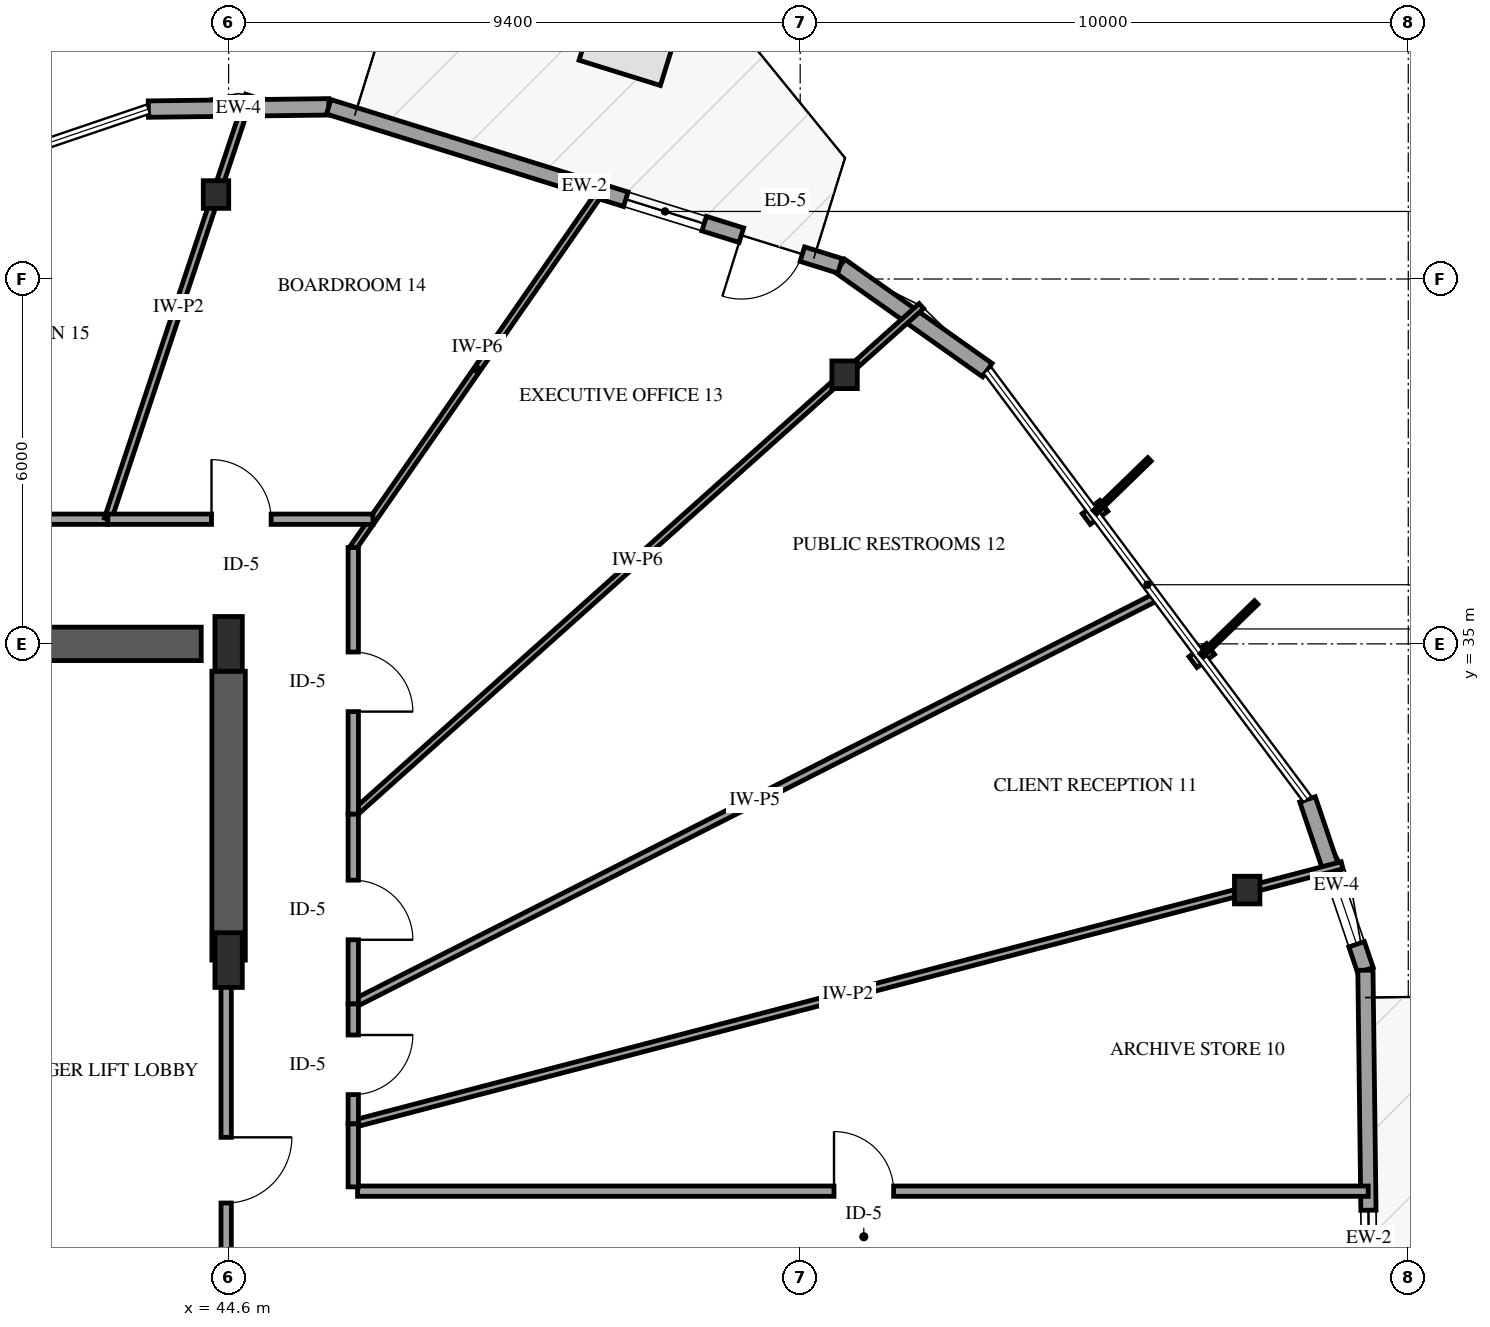
"""IFC4 building model, lengths in metres.
Left out: names, types, materials, properties, quantities, classifications, styles, units other than length and angle.
Written with IfcOpenShell. Run it as: python <this file> out.ifc"""

import sys

from ifc_helpers import new_model, si_unit, direction, frame, frame_2d, origin, origin_2d, place, context, subcontext, project, spatial, rectangle, i_section, extrude, element, fill, save


model = new_model("IFC4")
c1 = context("Model", 3, precision=1e-05, world=origin(), true_north=direction((0.0, 1.0)))
c2 = subcontext(c1, "Body", "Model", "MODEL_VIEW")
j1 = project(units=[si_unit("LENGTHUNIT", "METRE"), si_unit("PLANEANGLEUNIT", "RADIAN")], contexts=[c1])
p1 = place(None, origin())
s1 = spatial("IfcSite", under=j1, at=p1, CompositionType="ELEMENT")
p2 = place(p1, origin())
s2 = spatial("IfcBuilding", under=s1, at=p2, CompositionType="ELEMENT")
p3 = place(p2, frame((0.0, 0.0, 106.9)))
s3 = spatial("IfcBuildingStorey", under=s2, at=p3, CompositionType="ELEMENT", Elevation=106.9)
p4 = place(p3, frame((41.3, 35.0, 0.0), z_axis=(0.0, 0.0, 1.0), x_axis=(1.0, 0.0, 0.0)))
e1 = element("IfcWall", 1, at=p4, inside=s3, PredefinedType="SHEAR", context=c2, shape_type="SweptSolid", body=[
    extrude(rectangle(XDim=2.85, YDim=0.55, at=frame_2d((1.425, 0.0))), origin(), (0.0, 0.0, 1.0), 3.9),
])
p5 = place(p3, frame((44.6, 29.8, 0.0), z_axis=(0.0, 0.0, 1.0), x_axis=(0.0, 1.0, 0.0)))
e2 = element("IfcWall", 2, at=p5, inside=s3, PredefinedType="SHEAR", context=c2, shape_type="SweptSolid", body=[
    extrude(rectangle(XDim=4.75, YDim=0.55, at=frame_2d((2.375, 0.0))), origin(), (0.0, 0.0, 1.0), 3.9),
])
for number, where, z_axis, x_axis in (
    (3, (44.6, 29.8, 0.0), (0.0, 0.0, 1.0), (1.0, 0.0, 0.0)),
    (4, (44.6, 35.0, 0.0), (0.0, 0.0, 1.0), (1.0, 0.0, 0.0)),
):
    element("IfcColumn", number, at=place(p3, frame(where, z_axis=z_axis, x_axis=x_axis)), inside=s3, PredefinedType="PILASTER", context=c2, shape_type="SweptSolid", body=[
        extrude(rectangle(XDim=0.45, YDim=0.9, at=origin_2d()), origin(), (0.0, 0.0, 1.0), 3.9),
    ])
for number, where, z_axis, x_axis in (
    (5, (61.351, 30.951, 0.0), (0.0, 0.0, 1.0), (1.0, 0.0, 0.0)),
    (6, (54.73, 39.425, 0.0), (0.0, 0.0, 1.0), (1.0, 0.0, 0.0)),
    (7, (44.393, 42.389, 0.0), (0.0, 0.0, 1.0), (1.0, 0.0, 0.0)),
):
    element("IfcColumn", number, at=place(p3, frame(where, z_axis=z_axis, x_axis=x_axis)), inside=s3, PredefinedType="COLUMN", context=c2, shape_type="SweptSolid", body=[
        extrude(i_section(OverallWidth=0.418, OverallDepth=0.455, WebThickness=0.042, FlangeThickness=0.068, FilletRadius=0.038, at=origin_2d()), origin(), (0.0, 0.0, 1.0), 3.9),
    ])
p6 = place(p3, frame((57.077, 39.502, 0.0), z_axis=(0.0, 0.0, 1.0), x_axis=(-0.816333298617, 0.577581116009, 0.0)))
e8 = element("IfcWall", 8, at=p6, inside=s3, PredefinedType="SOLIDWALL", context=c2, shape_type="SweptSolid", body=[
    extrude(rectangle(XDim=2.967, YDim=0.27, at=frame_2d((1.483, 0.0))), origin(), (0.0, 0.0, 1.0), 2.979),
])
p7 = place(p3, frame((46.247, 43.832, 0.0), z_axis=(0.0, 0.0, 1.0), x_axis=(-0.999920709684, -0.012592630552, 0.0)))
e9 = element("IfcWall", 9, at=p7, inside=s3, PredefinedType="SOLIDWALL", context=c2, shape_type="SweptSolid", body=[
    extrude(rectangle(XDim=2.966, YDim=0.27, at=frame_2d((1.483, 0.0))), origin(), (0.0, 0.0, 1.0), 2.979),
])
p8 = place(p3, frame((54.656, 41.216, 0.0), z_axis=(0.0, 0.0, 1.0), x_axis=(-0.954863940641, 0.297043523516, 0.0)))
e10 = element("IfcWall", 10, at=p8, inside=s3, PredefinedType="SOLIDWALL", context=c2, shape_type="SweptSolid", body=[
    extrude(rectangle(XDim=8.807, YDim=0.25, at=frame_2d((4.403, 0.0))), origin(), (0.0, 0.0, 1.0), 2.979),
])
p9 = place(p8, frame((0.65, 0.0, 0.0)))
e11 = element("IfcOpeningElement", 11, at=p9, cuts=e10, PredefinedType="OPENING", context=c2, shape_type="SweptSolid", body=[
    extrude(rectangle(XDim=1.05, YDim=2.15, at=frame_2d((0.525, 1.075))), frame((0.0, 0.135, 0.0), z_axis=(0.0, -1.0, 0.0), x_axis=(1.0, 0.0, 0.0)), (0.0, 0.0, 1.0), 0.27),
])
p10 = place(p8, frame((2.34, 0.0, 0.72)))
e12 = element("IfcOpeningElement", 12, at=p10, cuts=e10, PredefinedType="OPENING", context=c2, shape_type="SweptSolid", body=[
    extrude(rectangle(XDim=1.35, YDim=1.65, at=frame_2d((0.675, 0.825))), frame((0.0, 0.135, 0.0), z_axis=(0.0, -1.0, 0.0), x_axis=(1.0, 0.0, 0.0)), (0.0, 0.0, 1.0), 0.27),
])
p11 = place(p3, frame((63.295, 29.634, 0.0), z_axis=(0.0, 0.0, 1.0), x_axis=(-0.320964212706, 0.947091323032, 0.0)))
e13 = element("IfcWall", 13, at=p11, inside=s3, PredefinedType="SOLIDWALL", context=c2, shape_type="SweptSolid", body=[
    extrude(rectangle(XDim=2.967, YDim=0.27, at=frame_2d((1.483, 0.0))), origin(), (0.0, 0.0, 1.0), 2.979),
])
p12 = place(p11, frame((0.45, 0.0, 0.75)))
e14 = element("IfcOpeningElement", 14, at=p12, cuts=e13, PredefinedType="OPENING", context=c2, shape_type="SweptSolid", body=[
    extrude(rectangle(XDim=0.9, YDim=1.5, at=frame_2d((0.45, 0.75))), frame((0.0, 0.145, 0.0), z_axis=(0.0, -1.0, 0.0), x_axis=(1.0, 0.0, 0.0)), (0.0, 0.0, 1.0), 0.29),
])
p13 = place(p3, frame((63.406, 20.828, 0.0), z_axis=(0.0, 0.0, 1.0), x_axis=(-0.012558271015, 0.999921141805, 0.0)))
e15 = element("IfcWall", 15, at=p13, inside=s3, PredefinedType="SOLIDWALL", context=c2, shape_type="SweptSolid", body=[
    extrude(rectangle(XDim=8.807, YDim=0.25, at=frame_2d((4.403, 0.0))), origin(), (0.0, 0.0, 1.0), 2.979),
])
p14 = place(p13, frame((0.65, 0.0, 0.0)))
e16 = element("IfcOpeningElement", 16, at=p14, cuts=e15, PredefinedType="OPENING", context=c2, shape_type="SweptSolid", body=[
    extrude(rectangle(XDim=1.05, YDim=2.15, at=frame_2d((0.525, 1.075))), frame((0.0, 0.135, 0.0), z_axis=(0.0, -1.0, 0.0), x_axis=(1.0, 0.0, 0.0)), (0.0, 0.0, 1.0), 0.27),
])
p15 = place(p13, frame((3.509, 0.0, 0.72)))
e17 = element("IfcOpeningElement", 17, at=p15, cuts=e15, PredefinedType="OPENING", context=c2, shape_type="SweptSolid", body=[
    extrude(rectangle(XDim=1.35, YDim=1.65, at=frame_2d((0.675, 0.825))), frame((0.0, 0.135, 0.0), z_axis=(0.0, -1.0, 0.0), x_axis=(1.0, 0.0, 0.0)), (0.0, 0.0, 1.0), 0.27),
])
p16 = place(p3, frame((46.65, 27.106, 0.0), z_axis=(0.0, 0.0, 1.0), x_axis=(0.967462851525, 0.253013104242, 0.0)))
e18 = element("IfcWall", 18, at=p16, inside=s3, PredefinedType="PARTITIONING", context=c2, shape_type="SweptSolid", body=[
    extrude(rectangle(XDim=16.809, YDim=0.12, at=frame_2d((8.405, 0.0))), origin(), (0.0, 0.0, 1.0), 2.895),
])
p17 = place(p3, frame((46.72, 26.0, 0.0), z_axis=(0.0, 0.0, 1.0), x_axis=(1.0, 0.0, 0.0)))
e19 = element("IfcWall", 19, at=p17, inside=s3, PredefinedType="PARTITIONING", context=c2, shape_type="SweptSolid", body=[
    extrude(rectangle(XDim=16.621, YDim=0.17, at=frame_2d((8.311, 0.0))), origin(), (0.0, 0.0, 1.0), 3.6),
])
p18 = place(p17, frame((7.836, 0.0, 0.0)))
e20 = element("IfcOpeningElement", 20, at=p18, cuts=e19, PredefinedType="OPENING", context=c2, shape_type="SweptSolid", body=[
    extrude(rectangle(XDim=0.98, YDim=2.15, at=frame_2d((0.49, 1.075))), frame((0.0, 0.095, 0.0), z_axis=(0.0, -1.0, 0.0), x_axis=(1.0, 0.0, 0.0)), (0.0, 0.0, 1.0), 0.19),
])
p19 = place(p3, frame((46.65, 29.079, 0.0), z_axis=(0.0, 0.0, 1.0), x_axis=(0.891973908544, 0.452086879345, 0.0)))
e21 = element("IfcWall", 21, at=p19, inside=s3, PredefinedType="PARTITIONING", context=c2, shape_type="SweptSolid", body=[
    extrude(rectangle(XDim=14.809, YDim=0.13, at=frame_2d((7.404, 0.0))), origin(), (0.0, 0.0, 1.0), 3.6),
])
p20 = place(p3, frame((46.65, 32.199, 0.0), z_axis=(0.0, 0.0, 1.0), x_axis=(0.74538342222, 0.666635998038, 0.0)))
e22 = element("IfcWall", 22, at=p20, inside=s3, PredefinedType="PARTITIONING", context=c2, shape_type="SweptSolid", body=[
    extrude(rectangle(XDim=12.534, YDim=0.11, at=frame_2d((6.267, 0.0))), origin(), (0.0, 0.0, 1.0), 2.978),
])
p21 = place(p3, frame((34.81, 37.05, 0.0), z_axis=(0.0, 0.0, 1.0), x_axis=(1.0, 0.0, 0.0)))
e23 = element("IfcWall", 23, at=p21, inside=s3, PredefinedType="PARTITIONING", context=c2, shape_type="SweptSolid", body=[
    extrude(rectangle(XDim=7.804, YDim=0.17, at=frame_2d((3.902, 0.0))), origin(), (0.0, 0.0, 1.0), 3.6),
])
p22 = place(p21, frame((3.427, 0.0, 0.0)))
e24 = element("IfcOpeningElement", 24, at=p22, cuts=e23, PredefinedType="OPENING", context=c2, shape_type="SweptSolid", body=[
    extrude(rectangle(XDim=0.98, YDim=2.15, at=frame_2d((0.49, 1.075))), frame((0.0, 0.095, 0.0), z_axis=(0.0, -1.0, 0.0), x_axis=(1.0, 0.0, 0.0)), (0.0, 0.0, 1.0), 0.19),
])
p23 = place(p3, frame((42.614, 37.05, 0.0), z_axis=(0.0, 0.0, 1.0), x_axis=(0.316108163988, 0.948723157017, 0.0)))
e25 = element("IfcWall", 25, at=p23, inside=s3, PredefinedType="PARTITIONING", context=c2, shape_type="SweptSolid", body=[
    extrude(rectangle(XDim=7.349, YDim=0.12, at=frame_2d((3.674, 0.0))), origin(), (0.0, 0.0, 1.0), 2.895),
])
p24 = place(p3, frame((46.65, 36.584, 0.0), z_axis=(0.0, 0.0, 1.0), x_axis=(0.570720394005, 0.821144464675, 0.0)))
e26 = element("IfcWall", 26, at=p24, inside=s3, PredefinedType="PARTITIONING", context=c2, shape_type="SweptSolid", body=[
    extrude(rectangle(XDim=7.131, YDim=0.11, at=frame_2d((3.566, 0.0))), origin(), (0.0, 0.0, 1.0), 3.6),
])
p25 = place(p3, frame((44.56, 29.8, 0.0), z_axis=(0.0, 0.0, 1.0), x_axis=(0.0, -1.0, 0.0)))
e27 = element("IfcWall", 27, at=p25, inside=s3, PredefinedType="PARTITIONING", context=c2, shape_type="SweptSolid", body=[
    extrude(rectangle(XDim=6.91, YDim=0.17, at=frame_2d((3.455, 0.0))), origin(), (0.0, 0.0, 1.0), 2.64),
])
p26 = place(p25, frame((2.915, 0.0, 0.0)))
e28 = element("IfcOpeningElement", 28, at=p26, cuts=e27, PredefinedType="OPENING", context=c2, shape_type="SweptSolid", body=[
    extrude(rectangle(XDim=1.08, YDim=2.15, at=frame_2d((0.54, 1.075))), frame((0.0, 0.095, 0.0), z_axis=(0.0, -1.0, 0.0), x_axis=(1.0, 0.0, 0.0)), (0.0, 0.0, 1.0), 0.19),
])
p27 = place(p3, frame((46.65, 36.584, 0.0), z_axis=(0.0, 0.0, 1.0), x_axis=(0.0, -1.0, 0.0)))
e29 = element("IfcWall", 29, at=p27, inside=s3, PredefinedType="PARTITIONING", context=c2, shape_type="SweptSolid", body=[
    extrude(rectangle(XDim=4.385, YDim=0.17, at=frame_2d((2.192, 0.0))), origin(), (0.0, 0.0, 1.0), 3.6),
])
p28 = place(p27, frame((1.718, 0.0, 0.0)))
e30 = element("IfcOpeningElement", 30, at=p28, cuts=e29, PredefinedType="OPENING", context=c2, shape_type="SweptSolid", body=[
    extrude(rectangle(XDim=0.98, YDim=2.15, at=frame_2d((0.49, 1.075))), frame((0.0, 0.095, 0.0), z_axis=(0.0, -1.0, 0.0), x_axis=(1.0, 0.0, 0.0)), (0.0, 0.0, 1.0), 0.19),
])
p29 = place(p3, frame((42.614, 37.05, 0.0), z_axis=(0.0, 0.0, 1.0), x_axis=(1.0, 0.0, 0.0)))
e31 = element("IfcWall", 31, at=p29, inside=s3, PredefinedType="PARTITIONING", context=c2, shape_type="SweptSolid", body=[
    extrude(rectangle(XDim=4.36, YDim=0.17, at=frame_2d((2.18, 0.0))), origin(), (0.0, 0.0, 1.0), 3.6),
])
p30 = place(p29, frame((1.705, 0.0, 0.0)))
e32 = element("IfcOpeningElement", 32, at=p30, cuts=e31, PredefinedType="OPENING", context=c2, shape_type="SweptSolid", body=[
    extrude(rectangle(XDim=0.98, YDim=2.15, at=frame_2d((0.49, 1.075))), frame((0.0, 0.095, 0.0), z_axis=(0.0, -1.0, 0.0), x_axis=(1.0, 0.0, 0.0)), (0.0, 0.0, 1.0), 0.19),
])
p31 = place(p3, frame((46.65, 32.199, 0.0), z_axis=(0.0, 0.0, 1.0), x_axis=(0.0, -1.0, 0.0)))
e33 = element("IfcWall", 33, at=p31, inside=s3, PredefinedType="PARTITIONING", context=c2, shape_type="SweptSolid", body=[
    extrude(rectangle(XDim=3.12, YDim=0.17, at=frame_2d((1.56, 0.0))), origin(), (0.0, 0.0, 1.0), 3.6),
])
p32 = place(p31, frame((1.085, 0.0, 0.0)))
e34 = element("IfcOpeningElement", 34, at=p32, cuts=e33, PredefinedType="OPENING", context=c2, shape_type="SweptSolid", body=[
    extrude(rectangle(XDim=0.98, YDim=2.15, at=frame_2d((0.49, 1.075))), frame((0.0, 0.095, 0.0), z_axis=(0.0, -1.0, 0.0), x_axis=(1.0, 0.0, 0.0)), (0.0, 0.0, 1.0), 0.19),
])
p33 = place(p3, frame((46.65, 29.079, 0.0), z_axis=(0.0, 0.0, 1.0), x_axis=(0.0, -1.0, 0.0)))
e35 = element("IfcWall", 35, at=p33, inside=s3, PredefinedType="PARTITIONING", context=c2, shape_type="SweptSolid", body=[
    extrude(rectangle(XDim=1.973, YDim=0.17, at=frame_2d((0.987, 0.0))), origin(), (0.0, 0.0, 1.0), 3.6),
])
p34 = place(p33, frame((0.511, 0.0, 0.0)))
e36 = element("IfcOpeningElement", 36, at=p34, cuts=e35, PredefinedType="OPENING", context=c2, shape_type="SweptSolid", body=[
    extrude(rectangle(XDim=0.98, YDim=2.15, at=frame_2d((0.49, 1.075))), frame((0.0, 0.095, 0.0), z_axis=(0.0, -1.0, 0.0), x_axis=(1.0, 0.0, 0.0)), (0.0, 0.0, 1.0), 0.19),
])
p35 = place(p3, frame((46.65, 27.106, 0.0), z_axis=(0.0, 0.0, 1.0), x_axis=(0.0, -1.0, 0.0)))
e37 = element("IfcWall", 37, at=p35, inside=s3, PredefinedType="PARTITIONING", context=c2, shape_type="SweptSolid", body=[
    extrude(rectangle(XDim=1.036, YDim=0.17, at=frame_2d((0.518, 0.0))), origin(), (0.0, 0.0, 1.0), 3.6),
])
p36 = place(p9, origin())
e38 = element("IfcDoor", 38, at=p36, inside=s3, OperationType="SINGLE_SWING_RIGHT", PredefinedType="DOOR", context=c2, shape_type="SweptSolid", body=[
    extrude(rectangle(XDim=1.05, YDim=2.15, at=frame_2d((0.525, 1.075))), frame((0.0, 0.025, 0.0), z_axis=(0.0, -1.0, 0.0), x_axis=(1.0, 0.0, 0.0)), (0.0, 0.0, 1.0), 0.05),
])
fill(e11, e38)
p37 = place(p10, origin())
e39 = element("IfcWindow", 39, at=p37, inside=s3, PartitioningType="SINGLE_PANEL", PredefinedType="WINDOW", context=c2, shape_type="SweptSolid", body=[
    extrude(rectangle(XDim=1.35, YDim=1.65, at=frame_2d((0.675, 0.825))), frame((0.0, 0.03, 0.0), z_axis=(0.0, -1.0, 0.0), x_axis=(1.0, 0.0, 0.0)), (0.0, 0.0, 1.0), 0.06),
])
fill(e12, e39)
p38 = place(p12, origin())
e40 = element("IfcWindow", 40, at=p38, inside=s3, PartitioningType="SINGLE_PANEL", PredefinedType="WINDOW", context=c2, shape_type="SweptSolid", body=[
    extrude(rectangle(XDim=0.9, YDim=1.5, at=frame_2d((0.45, 0.75))), frame((0.0, 0.03, 0.0), z_axis=(0.0, -1.0, 0.0), x_axis=(1.0, 0.0, 0.0)), (0.0, 0.0, 1.0), 0.06),
])
fill(e14, e40)
p39 = place(p15, origin())
e41 = element("IfcWindow", 41, at=p39, inside=s3, PartitioningType="SINGLE_PANEL", PredefinedType="WINDOW", context=c2, shape_type="SweptSolid", body=[
    extrude(rectangle(XDim=1.35, YDim=1.65, at=frame_2d((0.675, 0.825))), frame((0.0, 0.03, 0.0), z_axis=(0.0, -1.0, 0.0), x_axis=(1.0, 0.0, 0.0)), (0.0, 0.0, 1.0), 0.06),
])
fill(e17, e41)
p40 = place(p18, origin())
e42 = element("IfcDoor", 42, at=p40, inside=s3, OperationType="SINGLE_SWING_LEFT", PredefinedType="DOOR", context=c2, shape_type="SweptSolid", body=[
    extrude(rectangle(XDim=0.98, YDim=2.15, at=frame_2d((0.49, 1.075))), frame((0.0, 0.025, 0.0), z_axis=(0.0, -1.0, 0.0), x_axis=(1.0, 0.0, 0.0)), (0.0, 0.0, 1.0), 0.05),
])
fill(e20, e42)
p41 = place(p26, origin())
e43 = element("IfcDoor", 43, at=p41, inside=s3, OperationType="SINGLE_SWING_LEFT", PredefinedType="DOOR", context=c2, shape_type="SweptSolid", body=[
    extrude(rectangle(XDim=1.08, YDim=2.15, at=frame_2d((0.54, 1.075))), frame((0.0, 0.025, 0.0), z_axis=(0.0, -1.0, 0.0), x_axis=(1.0, 0.0, 0.0)), (0.0, 0.0, 1.0), 0.05),
])
fill(e28, e43)
p42 = place(p28, origin())
e44 = element("IfcDoor", 44, at=p42, inside=s3, OperationType="SINGLE_SWING_RIGHT", PredefinedType="DOOR", context=c2, shape_type="SweptSolid", body=[
    extrude(rectangle(XDim=0.98, YDim=2.15, at=frame_2d((0.49, 1.075))), frame((0.0, 0.025, 0.0), z_axis=(0.0, -1.0, 0.0), x_axis=(1.0, 0.0, 0.0)), (0.0, 0.0, 1.0), 0.05),
])
fill(e30, e44)
p43 = place(p30, origin())
e45 = element("IfcDoor", 45, at=p43, inside=s3, OperationType="SINGLE_SWING_LEFT", PredefinedType="DOOR", context=c2, shape_type="SweptSolid", body=[
    extrude(rectangle(XDim=0.98, YDim=2.15, at=frame_2d((0.49, 1.075))), frame((0.0, 0.025, 0.0), z_axis=(0.0, -1.0, 0.0), x_axis=(1.0, 0.0, 0.0)), (0.0, 0.0, 1.0), 0.05),
])
fill(e32, e45)
p44 = place(p32, origin())
e46 = element("IfcDoor", 46, at=p44, inside=s3, OperationType="SINGLE_SWING_RIGHT", PredefinedType="DOOR", context=c2, shape_type="SweptSolid", body=[
    extrude(rectangle(XDim=0.98, YDim=2.15, at=frame_2d((0.49, 1.075))), frame((0.0, 0.025, 0.0), z_axis=(0.0, -1.0, 0.0), x_axis=(1.0, 0.0, 0.0)), (0.0, 0.0, 1.0), 0.05),
])
fill(e34, e46)
p45 = place(p34, origin())
e47 = element("IfcDoor", 47, at=p45, inside=s3, OperationType="SINGLE_SWING_LEFT", PredefinedType="DOOR", context=c2, shape_type="SweptSolid", body=[
    extrude(rectangle(XDim=0.98, YDim=2.15, at=frame_2d((0.49, 1.075))), frame((0.0, 0.025, 0.0), z_axis=(0.0, -1.0, 0.0), x_axis=(1.0, 0.0, 0.0)), (0.0, 0.0, 1.0), 0.05),
])
fill(e36, e47)
save(model, sys.argv[1])
